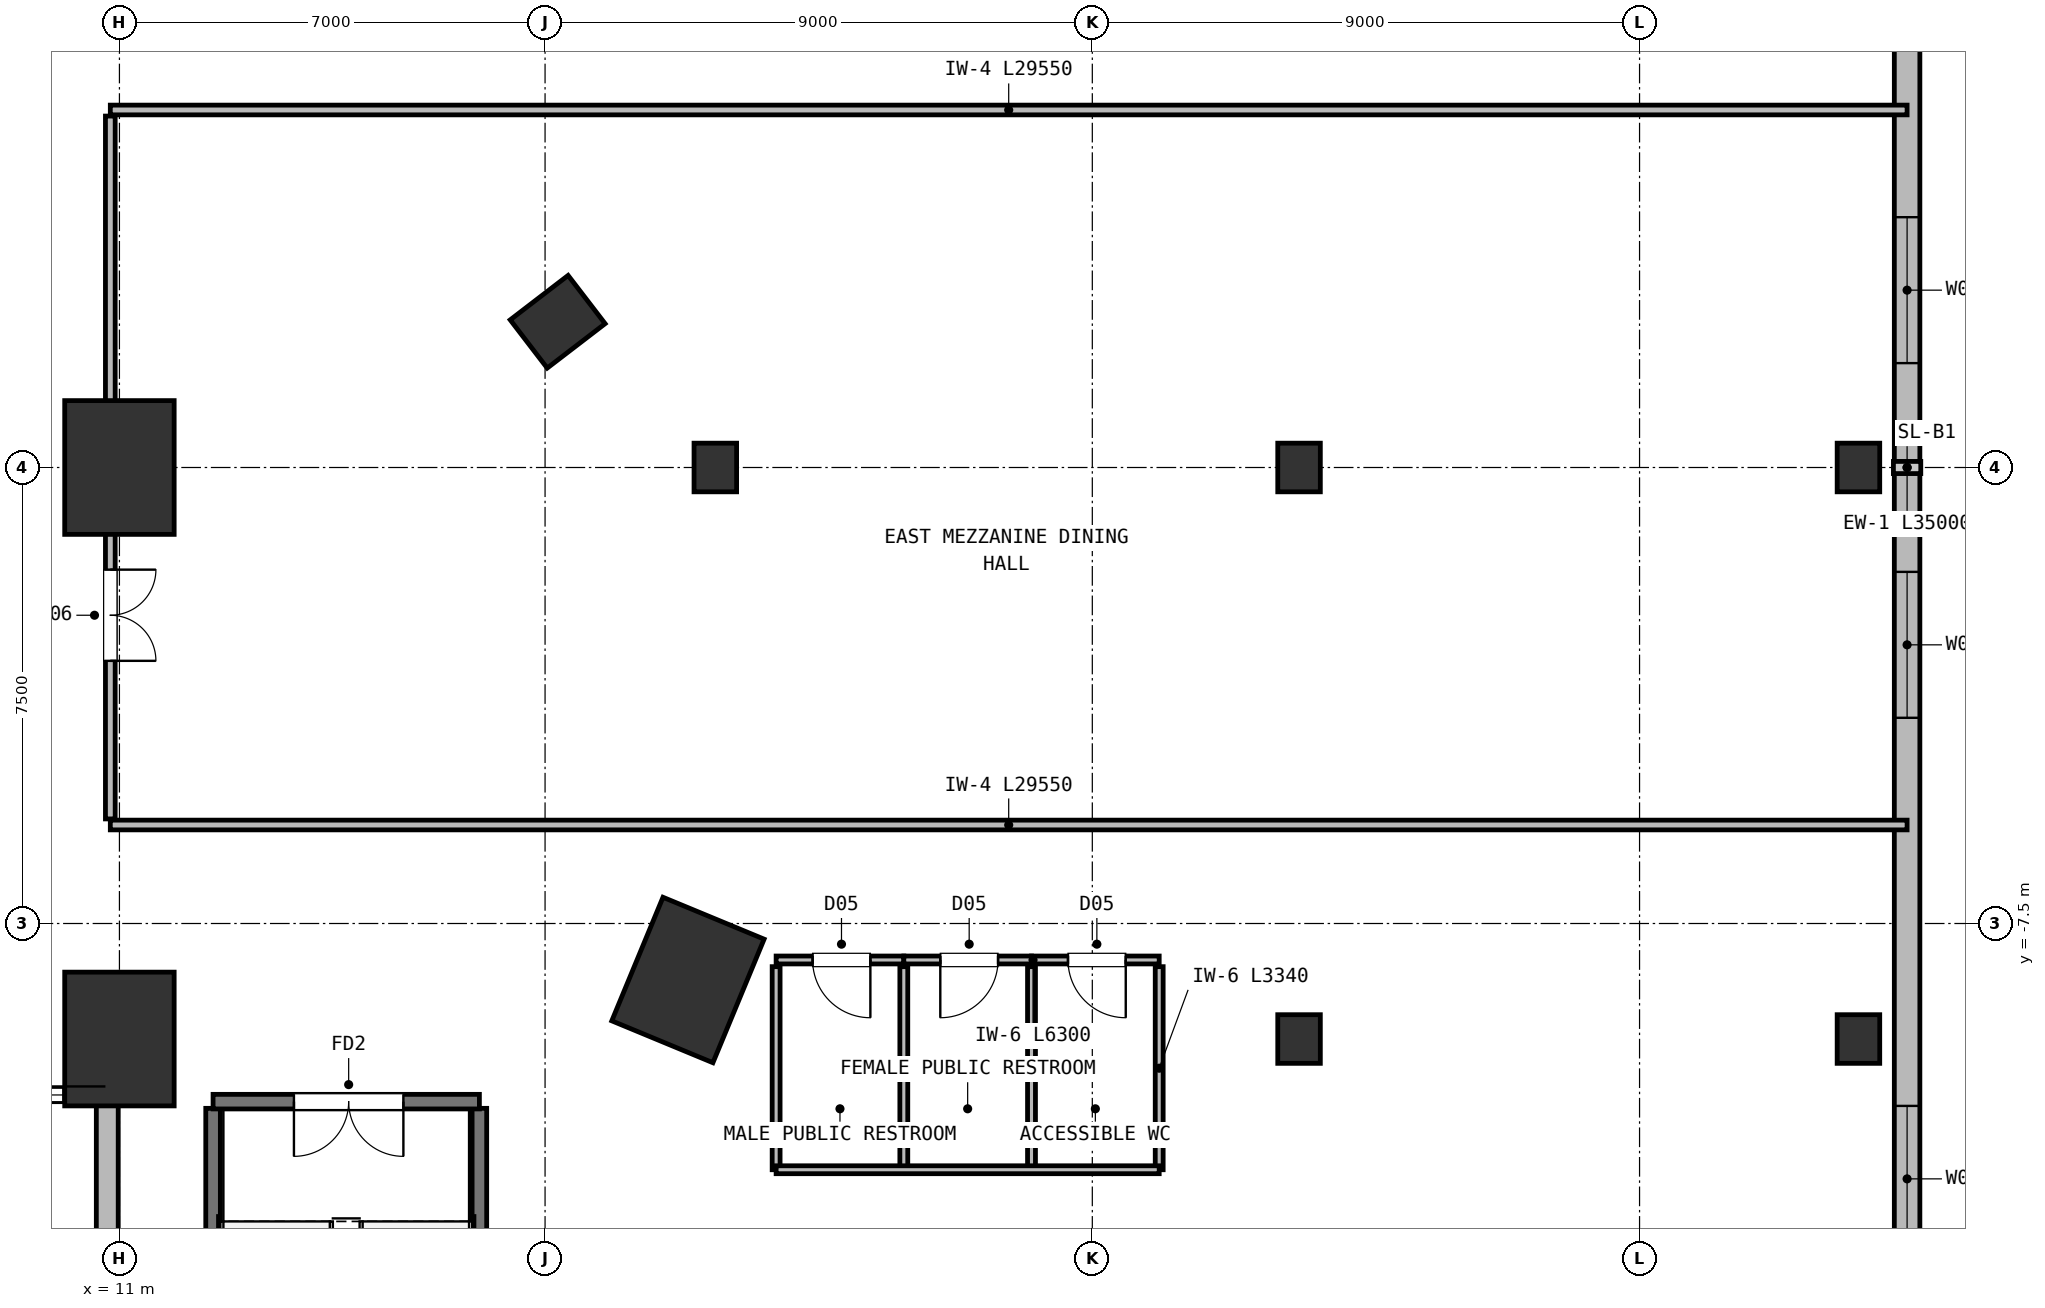
"""IFC4 building model, lengths in metres.
Left out: names, types, materials, properties, quantities, classifications, styles, units other than length and angle.
Written with IfcOpenShell. Run it as: python <this file> out.ifc"""

import sys

from ifc_helpers import new_model, si_unit, direction, frame, frame_2d, origin, origin_2d, place, context, subcontext, project, spatial, rectangle, extrude, element, fill, save


model = new_model("IFC4")
c1 = context("Model", 3, precision=1e-05, world=origin(), true_north=direction((0.0, 1.0)))
c2 = subcontext(c1, "Body", "Model", "MODEL_VIEW")
j1 = project(units=[si_unit("LENGTHUNIT", "METRE"), si_unit("PLANEANGLEUNIT", "RADIAN")], contexts=[c1])
p1 = place(None, origin())
s1 = spatial("IfcSite", under=j1, at=p1, CompositionType="ELEMENT")
p2 = place(p1, origin())
s2 = spatial("IfcBuilding", under=s1, at=p2, CompositionType="ELEMENT")
p3 = place(p2, frame((0.0, 0.0, 6.0)))
s3 = spatial("IfcBuildingStorey", under=s2, at=p3, CompositionType="ELEMENT", Elevation=6.0)
p4 = place(p3, frame((20.35, -8.429, 0.0), z_axis=(0.0, 0.0, 1.0), x_axis=(-0.923879532511, 0.382683432365, 0.0)))
e1 = element("IfcColumn", 1, at=p4, inside=s3, PredefinedType="COLUMN", context=c2, shape_type="SweptSolid", body=[
    extrude(rectangle(XDim=1.8, YDim=2.2, at=origin_2d()), origin(), (0.0, 0.0, 1.0), 5.0),
])
p5 = place(p3, frame((18.207, 2.397, 0.0), z_axis=(0.0, 0.0, 1.0), x_axis=(-0.608761429009, 0.793353340291, 0.0)))
e2 = element("IfcColumn", 2, at=p5, inside=s3, PredefinedType="COLUMN", context=c2, shape_type="SweptSolid", body=[
    extrude(rectangle(XDim=1.0, YDim=1.2, at=origin_2d()), origin(), (0.0, 0.0, 1.0), 5.0),
])
for number, where, z_axis, x_axis in (
    (3, (11.0, -9.4, 0.0), (0.0, 0.0, 1.0), (1.0, 0.0, 0.0)),
    (4, (11.0, 0.0, 0.0), (0.0, 0.0, 1.0), (1.0, 0.0, 0.0)),
):
    element("IfcColumn", number, at=place(p3, frame(where, z_axis=z_axis, x_axis=x_axis)), inside=s3, PredefinedType="COLUMN", context=c2, shape_type="SweptSolid", body=[
        extrude(rectangle(XDim=1.8, YDim=2.2, at=origin_2d()), origin(), (0.0, 0.0, 1.0), 5.0),
    ])
for number, where, z_axis, x_axis in (
    (5, (20.8, 0.0, 0.0), (0.0, 0.0, 1.0), (1.0, 0.0, 0.0)),
    (6, (30.4, -9.4, 0.0), (0.0, 0.0, 1.0), (1.0, 0.0, 0.0)),
    (7, (30.4, 0.0, 0.0), (0.0, 0.0, 1.0), (1.0, 0.0, 0.0)),
    (8, (39.6, -9.4, 0.0), (0.0, 0.0, 1.0), (1.0, 0.0, 0.0)),
    (9, (39.6, 0.0, 0.0), (0.0, 0.0, 1.0), (1.0, 0.0, 0.0)),
):
    element("IfcColumn", number, at=place(p3, frame(where, z_axis=z_axis, x_axis=x_axis)), inside=s3, PredefinedType="COLUMN", context=c2, shape_type="SweptSolid", body=[
        extrude(rectangle(XDim=0.7, YDim=0.8, at=origin_2d()), origin(), (0.0, 0.0, 1.0), 5.0),
    ])
p6 = place(p3, frame((10.8, -10.32, 0.0), z_axis=(0.0, 0.0, 1.0), x_axis=(0.0, -1.0, 0.0)))
e10 = element("IfcWall", 10, at=p6, inside=s3, PredefinedType="SOLIDWALL", context=c2, shape_type="SweptSolid", body=[
    extrude(rectangle(XDim=10.97, YDim=0.36, at=frame_2d((5.485, 0.0))), origin(), (0.0, 0.0, 1.0), 4.1),
])
p7 = place(p3, frame((40.4, 17.5, 0.0), z_axis=(0.0, 0.0, 1.0), x_axis=(0.0, -1.0, 0.0)))
e11 = element("IfcWall", 11, at=p7, inside=s3, PredefinedType="SOLIDWALL", context=c2, shape_type="SweptSolid", body=[
    extrude(rectangle(XDim=35.0, YDim=0.42, at=frame_2d((17.5, 0.0))), origin(), (0.0, 0.0, 1.0), 4.72),
])
p8 = place(p7, frame((1.717, 0.0, 0.95)))
e12 = element("IfcOpeningElement", 12, at=p8, cuts=e11, PredefinedType="OPENING", context=c2, shape_type="SweptSolid", body=[
    extrude(rectangle(XDim=2.4, YDim=2.6, at=frame_2d((1.2, 1.3))), frame((0.0, 0.22, 0.0), z_axis=(0.0, -1.0, 0.0), x_axis=(1.0, 0.0, 0.0)), (0.0, 0.0, 1.0), 0.44),
])
p9 = place(p7, frame((4.6, 0.0, 0.95)))
e13 = element("IfcOpeningElement", 13, at=p9, cuts=e11, PredefinedType="OPENING", context=c2, shape_type="SweptSolid", body=[
    extrude(rectangle(XDim=2.4, YDim=2.6, at=frame_2d((1.2, 1.3))), frame((0.0, 0.22, 0.0), z_axis=(0.0, -1.0, 0.0), x_axis=(1.0, 0.0, 0.0)), (0.0, 0.0, 1.0), 0.44),
])
p10 = place(p7, frame((13.383, 0.0, 0.95)))
e14 = element("IfcOpeningElement", 14, at=p10, cuts=e11, PredefinedType="OPENING", context=c2, shape_type="SweptSolid", body=[
    extrude(rectangle(XDim=2.4, YDim=2.6, at=frame_2d((1.2, 1.3))), frame((0.0, 0.22, 0.0), z_axis=(0.0, -1.0, 0.0), x_axis=(1.0, 0.0, 0.0)), (0.0, 0.0, 1.0), 0.44),
])
p11 = place(p7, frame((19.217, 0.0, 0.95)))
e15 = element("IfcOpeningElement", 15, at=p11, cuts=e11, PredefinedType="OPENING", context=c2, shape_type="SweptSolid", body=[
    extrude(rectangle(XDim=2.4, YDim=2.6, at=frame_2d((1.2, 1.3))), frame((0.0, 0.22, 0.0), z_axis=(0.0, -1.0, 0.0), x_axis=(1.0, 0.0, 0.0)), (0.0, 0.0, 1.0), 0.44),
])
p12 = place(p7, frame((28.0, 0.0, 0.95)))
e16 = element("IfcOpeningElement", 16, at=p12, cuts=e11, PredefinedType="OPENING", context=c2, shape_type="SweptSolid", body=[
    extrude(rectangle(XDim=2.4, YDim=2.6, at=frame_2d((1.2, 1.3))), frame((0.0, 0.22, 0.0), z_axis=(0.0, -1.0, 0.0), x_axis=(1.0, 0.0, 0.0)), (0.0, 0.0, 1.0), 0.44),
])
p13 = place(p7, frame((30.883, 0.0, 0.95)))
e17 = element("IfcOpeningElement", 17, at=p13, cuts=e11, PredefinedType="OPENING", context=c2, shape_type="SweptSolid", body=[
    extrude(rectangle(XDim=2.4, YDim=2.6, at=frame_2d((1.2, 1.3))), frame((0.0, 0.22, 0.0), z_axis=(0.0, -1.0, 0.0), x_axis=(1.0, 0.0, 0.0)), (0.0, 0.0, 1.0), 0.44),
])
for number, where, z_axis, x_axis in (
    (18, (12.54, -18.86, 0.0), (0.0, 0.0, 1.0), (0.0, 1.0, 0.0)),
    (19, (16.92, -18.86, 0.0), (0.0, 0.0, 1.0), (0.0, 1.0, 0.0)),
):
    element("IfcWall", number, at=place(p3, frame(where, z_axis=z_axis, x_axis=x_axis)), inside=s3, PredefinedType="SHEAR", context=c2, shape_type="SweptSolid", body=[
        extrude(rectangle(XDim=8.32, YDim=0.24, at=frame_2d((4.16, 0.0))), origin(), (0.0, 0.0, 1.0), 4.72),
    ])
p14 = place(p3, frame((16.92, -10.43, 0.0), z_axis=(0.0, 0.0, 1.0), x_axis=(-1.0, 0.0, 0.0)))
e20 = element("IfcWall", 20, at=p14, inside=s3, PredefinedType="SHEAR", context=c2, shape_type="SweptSolid", body=[
    extrude(rectangle(XDim=4.38, YDim=0.24, at=frame_2d((2.19, 0.0))), origin(), (0.0, 0.0, 1.0), 4.72),
])
p15 = place(p14, frame((1.25, 0.0, 0.0)))
e21 = element("IfcOpeningElement", 21, at=p15, cuts=e20, PredefinedType="OPENING", context=c2, shape_type="SweptSolid", body=[
    extrude(rectangle(XDim=1.8, YDim=2.2, at=frame_2d((0.9, 1.1))), frame((0.0, 0.13, 0.0), z_axis=(0.0, -1.0, 0.0), x_axis=(1.0, 0.0, 0.0)), (0.0, 0.0, 1.0), 0.26),
])
p16 = place(p3, frame((23.9, -8.1, 0.0), z_axis=(0.0, 0.0, 1.0), x_axis=(-1.0, 0.0, 0.0)))
e22 = element("IfcWall", 22, at=p16, inside=s3, PredefinedType="PARTITIONING", context=c2, shape_type="SweptSolid", body=[
    extrude(rectangle(XDim=2.1, YDim=0.13, at=frame_2d((1.05, 0.0))), origin(), (0.0, 0.0, 1.0), 4.72),
])
p17 = place(p16, frame((0.55, 0.0, 0.0)))
e23 = element("IfcOpeningElement", 23, at=p17, cuts=e22, PredefinedType="OPENING", context=c2, shape_type="SweptSolid", body=[
    extrude(rectangle(XDim=0.95, YDim=2.1, at=frame_2d((0.475, 1.05))), frame((0.0, 0.075, 0.0), z_axis=(0.0, -1.0, 0.0), x_axis=(1.0, 0.0, 0.0)), (0.0, 0.0, 1.0), 0.15),
])
p18 = place(p3, frame((21.8, -11.55, 0.0), z_axis=(0.0, 0.0, 1.0), x_axis=(0.0, 1.0, 0.0)))
e24 = element("IfcWall", 24, at=p18, inside=s3, PredefinedType="PARTITIONING", context=c2, shape_type="SweptSolid", body=[
    extrude(rectangle(XDim=3.34, YDim=0.13, at=frame_2d((1.67, 0.0))), origin(), (0.0, 0.0, 1.0), 4.72),
])
p19 = place(p3, frame((26.0, -8.1, 0.0), z_axis=(0.0, 0.0, 1.0), x_axis=(-1.0, 0.0, 0.0)))
e25 = element("IfcWall", 25, at=p19, inside=s3, PredefinedType="PARTITIONING", context=c2, shape_type="SweptSolid", body=[
    extrude(rectangle(XDim=2.1, YDim=0.13, at=frame_2d((1.05, 0.0))), origin(), (0.0, 0.0, 1.0), 4.72),
])
p20 = place(p19, frame((0.55, 0.0, 0.0)))
e26 = element("IfcOpeningElement", 26, at=p20, cuts=e25, PredefinedType="OPENING", context=c2, shape_type="SweptSolid", body=[
    extrude(rectangle(XDim=0.95, YDim=2.1, at=frame_2d((0.475, 1.05))), frame((0.0, 0.075, 0.0), z_axis=(0.0, -1.0, 0.0), x_axis=(1.0, 0.0, 0.0)), (0.0, 0.0, 1.0), 0.15),
])
p21 = place(p3, frame((23.9, -11.55, 0.0), z_axis=(0.0, 0.0, 1.0), x_axis=(0.0, 1.0, 0.0)))
e27 = element("IfcWall", 27, at=p21, inside=s3, PredefinedType="PARTITIONING", context=c2, shape_type="SweptSolid", body=[
    extrude(rectangle(XDim=3.34, YDim=0.13, at=frame_2d((1.67, 0.0))), origin(), (0.0, 0.0, 1.0), 4.72),
])
p22 = place(p3, frame((28.1, -8.1, 0.0), z_axis=(0.0, 0.0, 1.0), x_axis=(-1.0, 0.0, 0.0)))
e28 = element("IfcWall", 28, at=p22, inside=s3, PredefinedType="PARTITIONING", context=c2, shape_type="SweptSolid", body=[
    extrude(rectangle(XDim=2.1, YDim=0.13, at=frame_2d((1.05, 0.0))), origin(), (0.0, 0.0, 1.0), 4.72),
])
p23 = place(p22, frame((0.55, 0.0, 0.0)))
e29 = element("IfcOpeningElement", 29, at=p23, cuts=e28, PredefinedType="OPENING", context=c2, shape_type="SweptSolid", body=[
    extrude(rectangle(XDim=0.95, YDim=2.1, at=frame_2d((0.475, 1.05))), frame((0.0, 0.075, 0.0), z_axis=(0.0, -1.0, 0.0), x_axis=(1.0, 0.0, 0.0)), (0.0, 0.0, 1.0), 0.15),
])
for number, where, z_axis, x_axis in (
    (30, (26.0, -11.55, 0.0), (0.0, 0.0, 1.0), (0.0, 1.0, 0.0)),
    (31, (28.1, -11.55, 0.0), (0.0, 0.0, 1.0), (0.0, 1.0, 0.0)),
):
    element("IfcWall", number, at=place(p3, frame(where, z_axis=z_axis, x_axis=x_axis)), inside=s3, PredefinedType="PARTITIONING", context=c2, shape_type="SweptSolid", body=[
        extrude(rectangle(XDim=3.34, YDim=0.13, at=frame_2d((1.67, 0.0))), origin(), (0.0, 0.0, 1.0), 4.72),
    ])
p24 = place(p3, frame((21.8, -11.55, 0.0), z_axis=(0.0, 0.0, 1.0), x_axis=(1.0, 0.0, 0.0)))
e32 = element("IfcWall", 32, at=p24, inside=s3, PredefinedType="PARTITIONING", context=c2, shape_type="SweptSolid", body=[
    extrude(rectangle(XDim=6.3, YDim=0.13, at=frame_2d((3.15, 0.0))), origin(), (0.0, 0.0, 1.0), 4.72),
])
for number, where, z_axis, x_axis in (
    (33, (40.4, 5.88, 0.0), (0.0, 0.0, 1.0), (-1.0, 0.0, 0.0)),
    (34, (10.85, -5.88, 0.0), (0.0, 0.0, 1.0), (1.0, 0.0, 0.0)),
):
    element("IfcWall", number, at=place(p3, frame(where, z_axis=z_axis, x_axis=x_axis)), inside=s3, PredefinedType="PARTITIONING", context=c2, shape_type="SweptSolid", body=[
        extrude(rectangle(XDim=29.55, YDim=0.16, at=frame_2d((14.775, 0.0))), origin(), (0.0, 0.0, 1.0), 4.72),
    ])
p25 = place(p3, frame((10.85, 5.78, 0.0), z_axis=(0.0, 0.0, 1.0), x_axis=(0.0, -1.0, 0.0)))
e35 = element("IfcWall", 35, at=p25, inside=s3, PredefinedType="PARTITIONING", context=c2, shape_type="SweptSolid", body=[
    extrude(rectangle(XDim=11.56, YDim=0.16, at=frame_2d((5.78, 0.0))), origin(), (0.0, 0.0, 1.0), 4.1),
])
p26 = place(p25, frame((7.46, 0.0, 0.0)))
e36 = element("IfcOpeningElement", 36, at=p26, cuts=e35, PredefinedType="OPENING", context=c2, shape_type="SweptSolid", body=[
    extrude(rectangle(XDim=1.5, YDim=2.2, at=frame_2d((0.75, 1.1))), frame((0.0, 0.09, 0.0), z_axis=(0.0, -1.0, 0.0), x_axis=(1.0, 0.0, 0.0)), (0.0, 0.0, 1.0), 0.18),
])
p27 = place(p10, origin())
e37 = element("IfcWindow", 37, at=p27, inside=s3, PartitioningType="SINGLE_PANEL", PredefinedType="WINDOW", context=c2, shape_type="SweptSolid", body=[
    extrude(rectangle(XDim=2.4, YDim=2.6, at=frame_2d((1.2, 1.3))), frame((0.0, 0.03, 0.0), z_axis=(0.0, -1.0, 0.0), x_axis=(1.0, 0.0, 0.0)), (0.0, 0.0, 1.0), 0.06),
])
fill(e14, e37)
p28 = place(p11, origin())
e38 = element("IfcWindow", 38, at=p28, inside=s3, PartitioningType="SINGLE_PANEL", PredefinedType="WINDOW", context=c2, shape_type="SweptSolid", body=[
    extrude(rectangle(XDim=2.4, YDim=2.6, at=frame_2d((1.2, 1.3))), frame((0.0, 0.03, 0.0), z_axis=(0.0, -1.0, 0.0), x_axis=(1.0, 0.0, 0.0)), (0.0, 0.0, 1.0), 0.06),
])
fill(e15, e38)
p29 = place(p12, origin())
e39 = element("IfcWindow", 39, at=p29, inside=s3, PartitioningType="SINGLE_PANEL", PredefinedType="WINDOW", context=c2, shape_type="SweptSolid", body=[
    extrude(rectangle(XDim=2.4, YDim=2.6, at=frame_2d((1.2, 1.3))), frame((0.0, 0.03, 0.0), z_axis=(0.0, -1.0, 0.0), x_axis=(1.0, 0.0, 0.0)), (0.0, 0.0, 1.0), 0.06),
])
fill(e16, e39)
p30 = place(p15, origin())
e40 = element("IfcDoor", 40, at=p30, inside=s3, OperationType="DOUBLE_DOOR_SINGLE_SWING", PredefinedType="DOOR", context=c2, shape_type="SweptSolid", body=[
    extrude(rectangle(XDim=1.8, YDim=2.2, at=frame_2d((0.9, 1.1))), frame((0.0, 0.025, 0.0), z_axis=(0.0, -1.0, 0.0), x_axis=(1.0, 0.0, 0.0)), (0.0, 0.0, 1.0), 0.05),
])
fill(e21, e40)
p31 = place(p17, origin())
e41 = element("IfcDoor", 41, at=p31, inside=s3, OperationType="SINGLE_SWING_LEFT", PredefinedType="DOOR", context=c2, shape_type="SweptSolid", body=[
    extrude(rectangle(XDim=0.95, YDim=2.1, at=frame_2d((0.475, 1.05))), frame((0.0, 0.025, 0.0), z_axis=(0.0, -1.0, 0.0), x_axis=(1.0, 0.0, 0.0)), (0.0, 0.0, 1.0), 0.05),
])
fill(e23, e41)
p32 = place(p20, origin())
e42 = element("IfcDoor", 42, at=p32, inside=s3, OperationType="SINGLE_SWING_RIGHT", PredefinedType="DOOR", context=c2, shape_type="SweptSolid", body=[
    extrude(rectangle(XDim=0.95, YDim=2.1, at=frame_2d((0.475, 1.05))), frame((0.0, 0.025, 0.0), z_axis=(0.0, -1.0, 0.0), x_axis=(1.0, 0.0, 0.0)), (0.0, 0.0, 1.0), 0.05),
])
fill(e26, e42)
p33 = place(p23, origin())
e43 = element("IfcDoor", 43, at=p33, inside=s3, OperationType="SINGLE_SWING_LEFT", PredefinedType="DOOR", context=c2, shape_type="SweptSolid", body=[
    extrude(rectangle(XDim=0.95, YDim=2.1, at=frame_2d((0.475, 1.05))), frame((0.0, 0.025, 0.0), z_axis=(0.0, -1.0, 0.0), x_axis=(1.0, 0.0, 0.0)), (0.0, 0.0, 1.0), 0.05),
])
fill(e29, e43)
p34 = place(p26, origin())
e44 = element("IfcDoor", 44, at=p34, inside=s3, OperationType="DOUBLE_DOOR_SINGLE_SWING", PredefinedType="DOOR", context=c2, shape_type="SweptSolid", body=[
    extrude(rectangle(XDim=1.5, YDim=2.2, at=frame_2d((0.75, 1.1))), frame((0.0, 0.025, 0.0), z_axis=(0.0, -1.0, 0.0), x_axis=(1.0, 0.0, 0.0)), (0.0, 0.0, 1.0), 0.05),
])
fill(e36, e44)
save(model, sys.argv[1])
